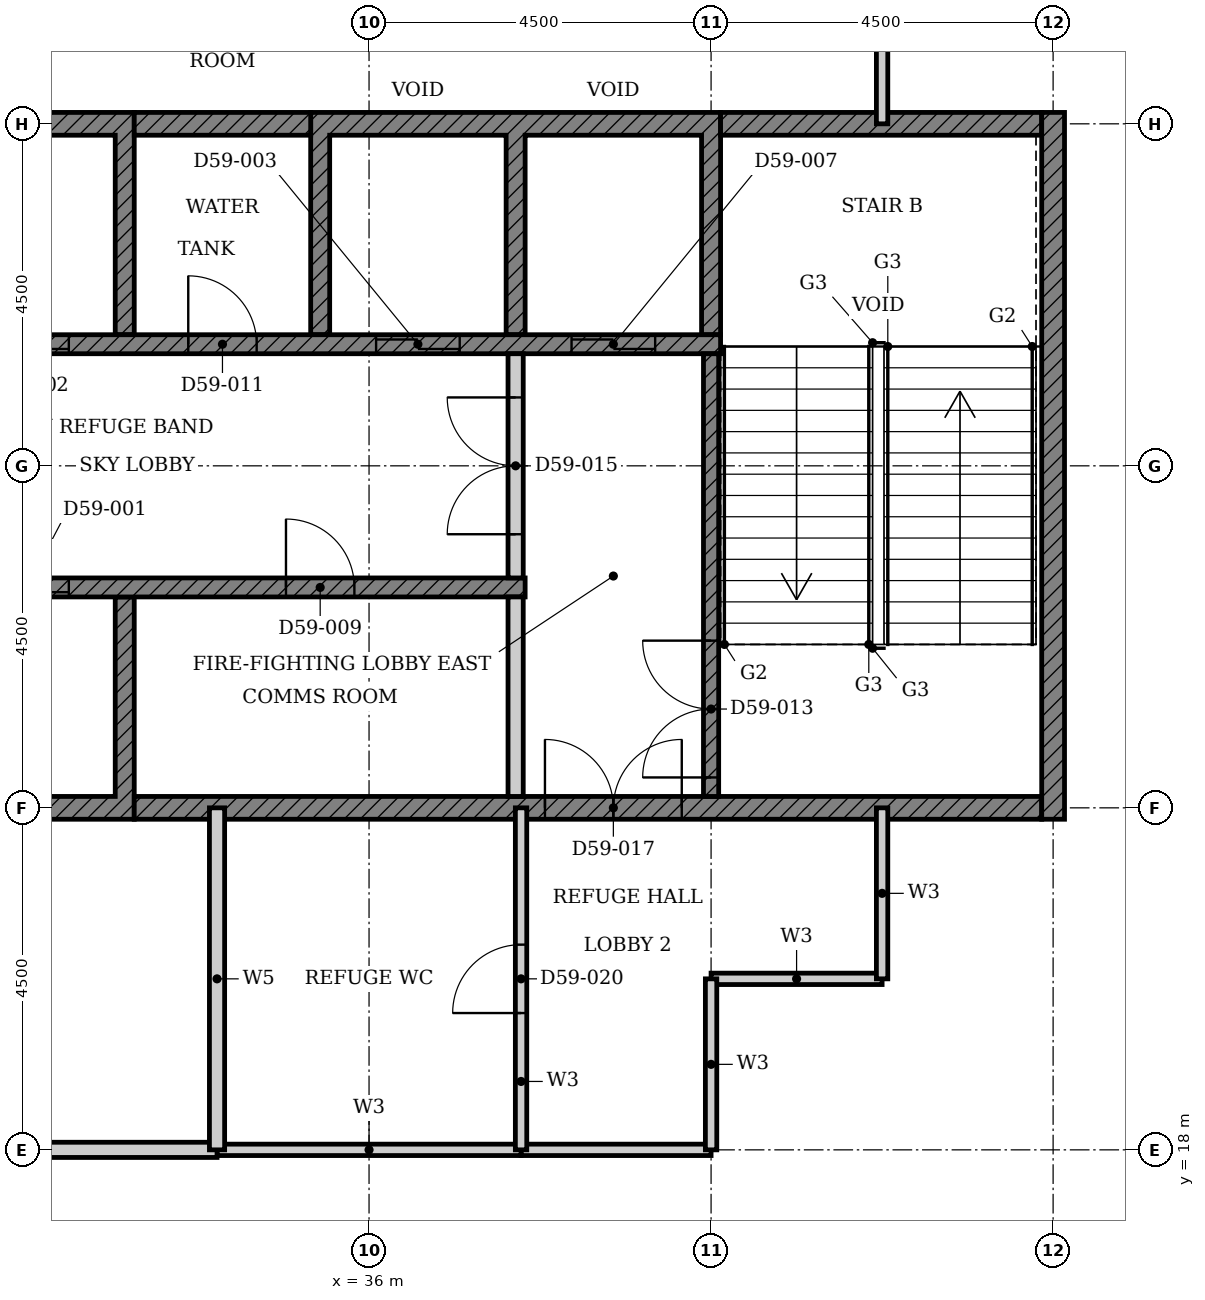
"""IFC4 building model, lengths in metres.
Left out: names, types, materials, properties, quantities, classifications, styles, units other than length and angle.
Written with IfcOpenShell. Run it as: python <this file> out.ifc"""

import sys

from ifc_helpers import new_model, si_unit, direction, frame, frame_2d, origin, place, context, subcontext, project, spatial, polyline, rectangle, outline, extrude, element, fill, save


model = new_model("IFC4")
c1 = context("Model", 3, precision=1e-05, world=origin(), true_north=direction((0.0, 1.0)))
c2 = subcontext(c1, "Body", "Model", "MODEL_VIEW")
j1 = project(units=[si_unit("LENGTHUNIT", "METRE"), si_unit("PLANEANGLEUNIT", "RADIAN")], contexts=[c1])
p1 = place(None, origin())
s1 = spatial("IfcSite", under=j1, at=p1, CompositionType="ELEMENT")
p2 = place(p1, origin())
s2 = spatial("IfcBuilding", under=s1, at=p2, CompositionType="ELEMENT")
p3 = place(p2, frame((0.0, 0.0, 233.1)))
s3 = spatial("IfcBuildingStorey", under=s2, at=p3, CompositionType="ELEMENT", Elevation=233.1)
p4 = place(p3, origin())
e1 = element("IfcWall", 1, at=p4, inside=s3, PredefinedType="SHEAR", context=c2, shape_type="SweptSolid", body=[
    extrude(outline(polyline([(27.518, 22.35), (32.911, 22.35), (32.911, 25.275), (32.661, 25.275), (32.661, 22.65), (30.339, 22.65), (30.339, 25.275), (30.089, 25.275), (30.089, 22.65), (27.768, 22.65), (27.768, 25.275), (27.518, 25.275), (27.518, 22.35)])), origin(), (0.0, 0.0, 1.0), 4.5),
])
p5 = place(p3, origin())
e2 = element("IfcWall", 2, at=p5, inside=s3, PredefinedType="SHEAR", context=c2, shape_type="SweptSolid", body=[
    extrude(outline(polyline([(27.518, 28.725), (27.768, 28.725), (27.768, 31.35), (30.089, 31.35), (30.089, 28.725), (30.339, 28.725), (30.339, 31.35), (32.661, 31.35), (32.661, 28.725), (32.911, 28.725), (32.911, 31.65), (27.518, 31.65), (27.518, 28.725)])), origin(), (0.0, 0.0, 1.0), 4.5),
])
p6 = place(p3, origin())
e3 = element("IfcWall", 3, at=p6, inside=s3, PredefinedType="SHEAR", context=c2, shape_type="SweptSolid", body=[
    extrude(outline(polyline([(35.232, 28.725), (35.482, 28.725), (35.482, 31.35), (37.803, 31.35), (37.803, 28.725), (38.053, 28.725), (38.053, 31.35), (40.375, 31.35), (40.375, 28.725), (40.625, 28.725), (40.625, 31.65), (35.232, 31.65), (35.232, 28.725)])), origin(), (0.0, 0.0, 1.0), 4.5),
])
p7 = place(p3, frame((32.911, 22.5, 0.0), z_axis=(0.0, 0.0, 1.0), x_axis=(1.0, 0.0, 0.0)))
e4 = element("IfcWall", 4, at=p7, inside=s3, PredefinedType="SHEAR", context=c2, shape_type="SweptSolid", body=[
    extrude(rectangle(XDim=11.939, YDim=0.3, at=frame_2d((5.97, 0.0))), origin(), (0.0, 0.0, 1.0), 4.5),
])
p8 = place(p7, frame((5.404, 0.0, 0.0)))
e5 = element("IfcOpeningElement", 5, at=p8, cuts=e4, PredefinedType="OPENING", context=c2, shape_type="SweptSolid", body=[
    extrude(rectangle(XDim=1.8, YDim=2.1, at=frame_2d((0.9, 1.05))), frame((0.0, 0.16, 0.0), z_axis=(0.0, -1.0, 0.0), x_axis=(1.0, 0.0, 0.0)), (0.0, 0.0, 1.0), 0.32),
])
p9 = place(p3, frame((32.911, 31.5, 0.0), z_axis=(0.0, 0.0, 1.0), x_axis=(1.0, 0.0, 0.0)))
e6 = element("IfcWall", 6, at=p9, inside=s3, PredefinedType="SHEAR", context=c2, shape_type="SweptSolid", body=[
    extrude(rectangle(XDim=2.322, YDim=0.3, at=frame_2d((1.161, 0.0))), origin(), (0.0, 0.0, 1.0), 4.5),
])
p10 = place(p3, frame((40.625, 31.5, 0.0), z_axis=(0.0, 0.0, 1.0), x_axis=(1.0, 0.0, 0.0)))
e7 = element("IfcWall", 7, at=p10, inside=s3, PredefinedType="SHEAR", context=c2, shape_type="SweptSolid", body=[
    extrude(rectangle(XDim=4.225, YDim=0.3, at=frame_2d((2.113, 0.0))), origin(), (0.0, 0.0, 1.0), 4.5),
])
p11 = place(p3, frame((45.0, 22.35, 0.0), z_axis=(0.0, 0.0, 1.0), x_axis=(0.0, 1.0, 0.0)))
e8 = element("IfcWall", 8, at=p11, inside=s3, PredefinedType="SHEAR", context=c2, shape_type="SweptSolid", body=[
    extrude(rectangle(XDim=9.3, YDim=0.3, at=frame_2d((4.65, 0.0))), origin(), (0.0, 0.0, 1.0), 4.5),
])
p12 = place(p3, frame((22.375, 25.4, 0.0), z_axis=(0.0, 0.0, 1.0), x_axis=(1.0, 0.0, 0.0)))
e9 = element("IfcWall", 9, at=p12, inside=s3, PredefinedType="SHEAR", context=c2, shape_type="SweptSolid", body=[
    extrude(rectangle(XDim=15.678, YDim=0.25, at=frame_2d((7.839, 0.0))), origin(), (0.0, 0.0, 1.0), 4.5),
])
p13 = place(p12, frame((8.575, 0.0, 0.0)))
e10 = element("IfcOpeningElement", 10, at=p13, cuts=e9, PredefinedType="OPENING", context=c2, shape_type="SweptSolid", body=[
    extrude(rectangle(XDim=1.1, YDim=2.1, at=frame_2d((0.55, 1.05))), frame((0.0, 0.135, 0.0), z_axis=(0.0, -1.0, 0.0), x_axis=(1.0, 0.0, 0.0)), (0.0, 0.0, 1.0), 0.27),
])
p14 = place(p12, frame((6.004, 0.0, 0.0)))
e11 = element("IfcOpeningElement", 11, at=p14, cuts=e9, PredefinedType="OPENING", context=c2, shape_type="SweptSolid", body=[
    extrude(rectangle(XDim=1.1, YDim=2.1, at=frame_2d((0.55, 1.05))), frame((0.0, 0.135, 0.0), z_axis=(0.0, -1.0, 0.0), x_axis=(1.0, 0.0, 0.0)), (0.0, 0.0, 1.0), 0.27),
])
p15 = place(p12, frame((0.861, 0.0, 0.0)))
e12 = element("IfcOpeningElement", 12, at=p15, cuts=e9, PredefinedType="OPENING", context=c2, shape_type="SweptSolid", body=[
    extrude(rectangle(XDim=1.1, YDim=2.1, at=frame_2d((0.55, 1.05))), frame((0.0, 0.135, 0.0), z_axis=(0.0, -1.0, 0.0), x_axis=(1.0, 0.0, 0.0)), (0.0, 0.0, 1.0), 0.27),
])
p16 = place(p12, frame((3.532, 0.0, 0.0)))
e13 = element("IfcOpeningElement", 13, at=p16, cuts=e9, PredefinedType="OPENING", context=c2, shape_type="SweptSolid", body=[
    extrude(rectangle(XDim=0.9, YDim=2.1, at=frame_2d((0.45, 1.05))), frame((0.0, 0.135, 0.0), z_axis=(0.0, -1.0, 0.0), x_axis=(1.0, 0.0, 0.0)), (0.0, 0.0, 1.0), 0.27),
])
p17 = place(p12, frame((12.532, 0.0, 0.0)))
e14 = element("IfcOpeningElement", 14, at=p17, cuts=e9, PredefinedType="OPENING", context=c2, shape_type="SweptSolid", body=[
    extrude(rectangle(XDim=0.9, YDim=2.1, at=frame_2d((0.45, 1.05))), frame((0.0, 0.135, 0.0), z_axis=(0.0, -1.0, 0.0), x_axis=(1.0, 0.0, 0.0)), (0.0, 0.0, 1.0), 0.27),
])
p18 = place(p3, frame((24.947, 28.6, 0.0), z_axis=(0.0, 0.0, 1.0), x_axis=(1.0, 0.0, 0.0)))
e15 = element("IfcWall", 15, at=p18, inside=s3, PredefinedType="SHEAR", context=c2, shape_type="SweptSolid", body=[
    extrude(rectangle(XDim=15.678, YDim=0.25, at=frame_2d((7.839, 0.0))), origin(), (0.0, 0.0, 1.0), 4.5),
])
p19 = place(p18, frame((6.004, 0.0, 0.0)))
e16 = element("IfcOpeningElement", 16, at=p19, cuts=e15, PredefinedType="OPENING", context=c2, shape_type="SweptSolid", body=[
    extrude(rectangle(XDim=1.1, YDim=2.1, at=frame_2d((0.55, 1.05))), frame((0.0, 0.135, 0.0), z_axis=(0.0, -1.0, 0.0), x_axis=(1.0, 0.0, 0.0)), (0.0, 0.0, 1.0), 0.27),
])
p20 = place(p18, frame((11.146, 0.0, 0.0)))
e17 = element("IfcOpeningElement", 17, at=p20, cuts=e15, PredefinedType="OPENING", context=c2, shape_type="SweptSolid", body=[
    extrude(rectangle(XDim=1.1, YDim=2.1, at=frame_2d((0.55, 1.05))), frame((0.0, 0.135, 0.0), z_axis=(0.0, -1.0, 0.0), x_axis=(1.0, 0.0, 0.0)), (0.0, 0.0, 1.0), 0.27),
])
p21 = place(p18, frame((3.432, 0.0, 0.0)))
e18 = element("IfcOpeningElement", 18, at=p21, cuts=e15, PredefinedType="OPENING", context=c2, shape_type="SweptSolid", body=[
    extrude(rectangle(XDim=1.1, YDim=2.1, at=frame_2d((0.55, 1.05))), frame((0.0, 0.135, 0.0), z_axis=(0.0, -1.0, 0.0), x_axis=(1.0, 0.0, 0.0)), (0.0, 0.0, 1.0), 0.27),
])
p22 = place(p18, frame((13.718, 0.0, 0.0)))
e19 = element("IfcOpeningElement", 19, at=p22, cuts=e15, PredefinedType="OPENING", context=c2, shape_type="SweptSolid", body=[
    extrude(rectangle(XDim=1.1, YDim=2.1, at=frame_2d((0.55, 1.05))), frame((0.0, 0.135, 0.0), z_axis=(0.0, -1.0, 0.0), x_axis=(1.0, 0.0, 0.0)), (0.0, 0.0, 1.0), 0.27),
])
p23 = place(p18, frame((0.961, 0.0, 0.0)))
e20 = element("IfcOpeningElement", 20, at=p23, cuts=e15, PredefinedType="OPENING", context=c2, shape_type="SweptSolid", body=[
    extrude(rectangle(XDim=0.9, YDim=2.1, at=frame_2d((0.45, 1.05))), frame((0.0, 0.135, 0.0), z_axis=(0.0, -1.0, 0.0), x_axis=(1.0, 0.0, 0.0)), (0.0, 0.0, 1.0), 0.27),
])
p24 = place(p18, frame((8.675, 0.0, 0.0)))
e21 = element("IfcOpeningElement", 21, at=p24, cuts=e15, PredefinedType="OPENING", context=c2, shape_type="SweptSolid", body=[
    extrude(rectangle(XDim=0.9, YDim=2.1, at=frame_2d((0.45, 1.05))), frame((0.0, 0.135, 0.0), z_axis=(0.0, -1.0, 0.0), x_axis=(1.0, 0.0, 0.0)), (0.0, 0.0, 1.0), 0.27),
])
p25 = place(p3, frame((37.928, 22.65, 0.0), z_axis=(0.0, 0.0, 1.0), x_axis=(0.0, 1.0, 0.0)))
e22 = element("IfcWall", 22, at=p25, inside=s3, PredefinedType="PARTITIONING", context=c2, shape_type="SweptSolid", body=[
    extrude(rectangle(XDim=2.625, YDim=0.2, at=frame_2d((1.312, 0.0))), origin(), (0.0, 0.0, 1.0), 4.5),
])
p26 = place(p3, frame((40.5, 22.65, 0.0), z_axis=(0.0, 0.0, 1.0), x_axis=(0.0, 1.0, 0.0)))
e23 = element("IfcWall", 23, at=p26, inside=s3, PredefinedType="SHEAR", context=c2, shape_type="SweptSolid", body=[
    extrude(rectangle(XDim=5.825, YDim=0.2, at=frame_2d((2.913, 0.0))), origin(), (0.0, 0.0, 1.0), 4.5),
])
p27 = place(p26, frame((0.25, 0.0, 0.0)))
e24 = element("IfcOpeningElement", 24, at=p27, cuts=e23, PredefinedType="OPENING", context=c2, shape_type="SweptSolid", body=[
    extrude(rectangle(XDim=1.8, YDim=2.1, at=frame_2d((0.9, 1.05))), frame((0.0, 0.11, 0.0), z_axis=(0.0, -1.0, 0.0), x_axis=(1.0, 0.0, 0.0)), (0.0, 0.0, 1.0), 0.22),
])
p28 = place(p3, frame((37.928, 25.525, 0.0), z_axis=(0.0, 0.0, 1.0), x_axis=(0.0, 1.0, 0.0)))
e25 = element("IfcWall", 25, at=p28, inside=s3, PredefinedType="PARTITIONING", context=c2, shape_type="SweptSolid", body=[
    extrude(rectangle(XDim=2.95, YDim=0.2, at=frame_2d((1.475, 0.0))), origin(), (0.0, 0.0, 1.0), 4.5),
])
p29 = place(p28, frame((0.575, 0.0, 0.0)))
e26 = element("IfcOpeningElement", 26, at=p29, cuts=e25, PredefinedType="OPENING", context=c2, shape_type="SweptSolid", body=[
    extrude(rectangle(XDim=1.8, YDim=2.1, at=frame_2d((0.9, 1.05))), frame((0.0, 0.11, 0.0), z_axis=(0.0, -1.0, 0.0), x_axis=(1.0, 0.0, 0.0)), (0.0, 0.0, 1.0), 0.22),
])
p30 = place(p3, frame((38.0, 18.0, 0.0), z_axis=(0.0, 0.0, 1.0), x_axis=(1.0, 0.0, 0.0)))
e27 = element("IfcWall", 27, at=p30, inside=s3, PredefinedType="PARTITIONING", context=c2, shape_type="SweptSolid", body=[
    extrude(rectangle(XDim=2.5, YDim=0.15, at=frame_2d((1.25, 0.0))), origin(), (0.0, 0.0, 1.0), 4.5),
])
p31 = place(p3, frame((34.0, 18.0, 0.0), z_axis=(0.0, 0.0, 1.0), x_axis=(1.0, 0.0, 0.0)))
e28 = element("IfcWall", 28, at=p31, inside=s3, PredefinedType="PARTITIONING", context=c2, shape_type="SweptSolid", body=[
    extrude(rectangle(XDim=4.0, YDim=0.15, at=frame_2d((2.0, 0.0))), origin(), (0.0, 0.0, 1.0), 4.5),
])
p32 = place(p3, frame((40.5, 20.25, 0.0), z_axis=(0.0, 0.0, 1.0), x_axis=(1.0, 0.0, 0.0)))
e29 = element("IfcWall", 29, at=p32, inside=s3, PredefinedType="PARTITIONING", context=c2, shape_type="SweptSolid", body=[
    extrude(rectangle(XDim=2.25, YDim=0.15, at=frame_2d((1.125, 0.0))), origin(), (0.0, 0.0, 1.0), 4.5),
])
p33 = place(p3, frame((38.0, 18.0, 0.0), z_axis=(0.0, 0.0, 1.0), x_axis=(0.0, 1.0, 0.0)))
e30 = element("IfcWall", 30, at=p33, inside=s3, PredefinedType="PARTITIONING", context=c2, shape_type="SweptSolid", body=[
    extrude(rectangle(XDim=4.5, YDim=0.15, at=frame_2d((2.25, 0.0))), origin(), (0.0, 0.0, 1.0), 4.5),
])
p34 = place(p33, frame((1.8, 0.0, 0.0)))
e31 = element("IfcOpeningElement", 31, at=p34, cuts=e30, PredefinedType="OPENING", context=c2, shape_type="SweptSolid", body=[
    extrude(rectangle(XDim=0.9, YDim=2.1, at=frame_2d((0.45, 1.05))), frame((0.0, 0.085, 0.0), z_axis=(0.0, -1.0, 0.0), x_axis=(1.0, 0.0, 0.0)), (0.0, 0.0, 1.0), 0.17),
])
for number, where, z_axis, x_axis in (
    (32, (40.5, 18.0, 0.0), (0.0, 0.0, 1.0), (0.0, 1.0, 0.0)),
    (33, (42.75, 31.5, 0.0), (0.0, 0.0, 1.0), (0.0, 1.0, 0.0)),
    (34, (42.75, 20.25, 0.0), (0.0, 0.0, 1.0), (0.0, 1.0, 0.0)),
):
    element("IfcWall", number, at=place(p3, frame(where, z_axis=z_axis, x_axis=x_axis)), inside=s3, PredefinedType="PARTITIONING", context=c2, shape_type="SweptSolid", body=[
        extrude(rectangle(XDim=2.25, YDim=0.15, at=frame_2d((1.125, 0.0))), origin(), (0.0, 0.0, 1.0), 4.5),
    ])
p35 = place(p3, frame((22.5, 18.0, 0.0), z_axis=(0.0, 0.0, 1.0), x_axis=(1.0, 0.0, 0.0)))
e35 = element("IfcWall", 35, at=p35, inside=s3, PredefinedType="PARTITIONING", context=c2, shape_type="SweptSolid", body=[
    extrude(rectangle(XDim=11.5, YDim=0.2, at=frame_2d((5.75, 0.0))), origin(), (0.0, 0.0, 1.0), 4.5),
])
p36 = place(p35, frame((5.15, 0.0, 0.0)))
e36 = element("IfcOpeningElement", 36, at=p36, cuts=e35, PredefinedType="OPENING", context=c2, shape_type="SweptSolid", body=[
    extrude(rectangle(XDim=1.2, YDim=2.1, at=frame_2d((0.6, 1.05))), frame((0.0, 0.11, 0.0), z_axis=(0.0, -1.0, 0.0), x_axis=(1.0, 0.0, 0.0)), (0.0, 0.0, 1.0), 0.22),
])
p37 = place(p3, frame((34.0, 18.0, 0.0), z_axis=(0.0, 0.0, 1.0), x_axis=(0.0, 1.0, 0.0)))
e37 = element("IfcWall", 37, at=p37, inside=s3, PredefinedType="PARTITIONING", context=c2, shape_type="SweptSolid", body=[
    extrude(rectangle(XDim=4.5, YDim=0.2, at=frame_2d((2.25, 0.0))), origin(), (0.0, 0.0, 1.0), 4.5),
])
p38 = place(p13, origin())
e38 = element("IfcDoor", 38, at=p38, inside=s3, OperationType="DOUBLE_DOOR_SLIDING", PredefinedType="DOOR", context=c2, shape_type="SweptSolid", body=[
    extrude(rectangle(XDim=1.1, YDim=2.1, at=frame_2d((0.55, 1.05))), frame((0.0, 0.025, 0.0), z_axis=(0.0, -1.0, 0.0), x_axis=(1.0, 0.0, 0.0)), (0.0, 0.0, 1.0), 0.05),
])
fill(e10, e38)
p39 = place(p19, origin())
e39 = element("IfcDoor", 39, at=p39, inside=s3, OperationType="DOUBLE_DOOR_SLIDING", PredefinedType="DOOR", context=c2, shape_type="SweptSolid", body=[
    extrude(rectangle(XDim=1.1, YDim=2.1, at=frame_2d((0.55, 1.05))), frame((0.0, 0.025, 0.0), z_axis=(0.0, -1.0, 0.0), x_axis=(1.0, 0.0, 0.0)), (0.0, 0.0, 1.0), 0.05),
])
fill(e16, e39)
p40 = place(p20, origin())
e40 = element("IfcDoor", 40, at=p40, inside=s3, OperationType="DOUBLE_DOOR_SLIDING", PredefinedType="DOOR", context=c2, shape_type="SweptSolid", body=[
    extrude(rectangle(XDim=1.1, YDim=2.1, at=frame_2d((0.55, 1.05))), frame((0.0, 0.025, 0.0), z_axis=(0.0, -1.0, 0.0), x_axis=(1.0, 0.0, 0.0)), (0.0, 0.0, 1.0), 0.05),
])
fill(e17, e40)
p41 = place(p22, origin())
e41 = element("IfcDoor", 41, at=p41, inside=s3, OperationType="DOUBLE_DOOR_SLIDING", PredefinedType="DOOR", context=c2, shape_type="SweptSolid", body=[
    extrude(rectangle(XDim=1.1, YDim=2.1, at=frame_2d((0.55, 1.05))), frame((0.0, 0.025, 0.0), z_axis=(0.0, -1.0, 0.0), x_axis=(1.0, 0.0, 0.0)), (0.0, 0.0, 1.0), 0.05),
])
fill(e19, e41)
p42 = place(p17, origin())
e42 = element("IfcDoor", 42, at=p42, inside=s3, OperationType="SINGLE_SWING_LEFT", PredefinedType="DOOR", context=c2, shape_type="SweptSolid", body=[
    extrude(rectangle(XDim=0.9, YDim=2.1, at=frame_2d((0.45, 1.05))), frame((0.0, 0.025, 0.0), z_axis=(0.0, -1.0, 0.0), x_axis=(1.0, 0.0, 0.0)), (0.0, 0.0, 1.0), 0.05),
])
fill(e14, e42)
p43 = place(p24, origin())
e43 = element("IfcDoor", 43, at=p43, inside=s3, OperationType="SINGLE_SWING_LEFT", PredefinedType="DOOR", context=c2, shape_type="SweptSolid", body=[
    extrude(rectangle(XDim=0.9, YDim=2.1, at=frame_2d((0.45, 1.05))), frame((0.0, 0.025, 0.0), z_axis=(0.0, -1.0, 0.0), x_axis=(1.0, 0.0, 0.0)), (0.0, 0.0, 1.0), 0.05),
])
fill(e21, e43)
p44 = place(p27, origin())
e44 = element("IfcDoor", 44, at=p44, inside=s3, OperationType="DOUBLE_DOOR_SINGLE_SWING", PredefinedType="DOOR", context=c2, shape_type="SweptSolid", body=[
    extrude(rectangle(XDim=1.8, YDim=2.1, at=frame_2d((0.9, 1.05))), frame((0.0, 0.025, 0.0), z_axis=(0.0, -1.0, 0.0), x_axis=(1.0, 0.0, 0.0)), (0.0, 0.0, 1.0), 0.05),
])
fill(e24, e44)
p45 = place(p29, origin())
e45 = element("IfcDoor", 45, at=p45, inside=s3, OperationType="DOUBLE_DOOR_SINGLE_SWING", PredefinedType="DOOR", context=c2, shape_type="SweptSolid", body=[
    extrude(rectangle(XDim=1.8, YDim=2.1, at=frame_2d((0.9, 1.05))), frame((0.0, 0.025, 0.0), z_axis=(0.0, -1.0, 0.0), x_axis=(1.0, 0.0, 0.0)), (0.0, 0.0, 1.0), 0.05),
])
fill(e26, e45)
p46 = place(p8, origin())
e46 = element("IfcDoor", 46, at=p46, inside=s3, OperationType="DOUBLE_DOOR_SINGLE_SWING", PredefinedType="DOOR", context=c2, shape_type="SweptSolid", body=[
    extrude(rectangle(XDim=1.8, YDim=2.1, at=frame_2d((0.9, 1.05))), frame((0.0, 0.025, 0.0), z_axis=(0.0, -1.0, 0.0), x_axis=(1.0, 0.0, 0.0)), (0.0, 0.0, 1.0), 0.05),
])
fill(e5, e46)
p47 = place(p34, origin())
e47 = element("IfcDoor", 47, at=p47, inside=s3, OperationType="SINGLE_SWING_LEFT", PredefinedType="DOOR", context=c2, shape_type="SweptSolid", body=[
    extrude(rectangle(XDim=0.9, YDim=2.1, at=frame_2d((0.45, 1.05))), frame((0.0, 0.025, 0.0), z_axis=(0.0, -1.0, 0.0), x_axis=(1.0, 0.0, 0.0)), (0.0, 0.0, 1.0), 0.05),
])
fill(e31, e47)
save(model, sys.argv[1])
